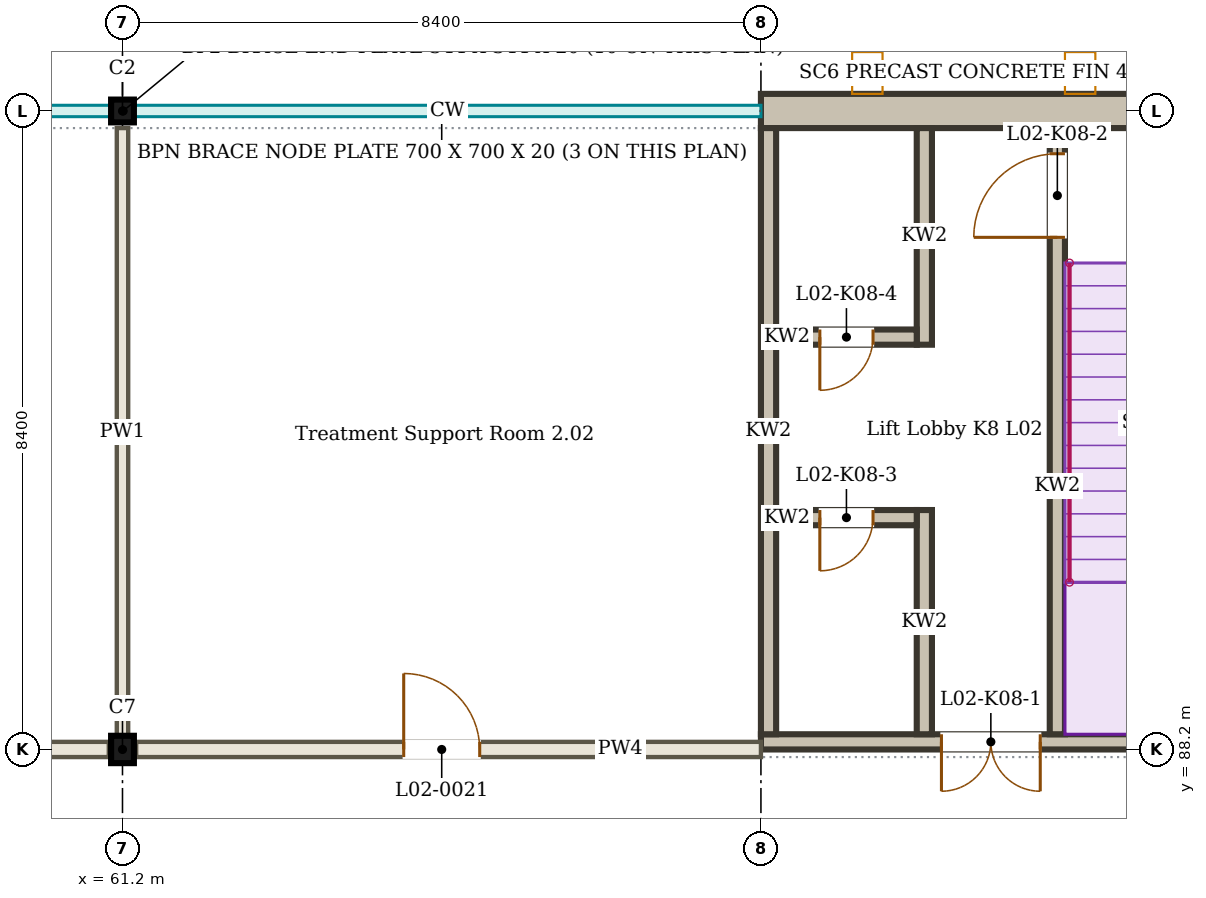
"""IFC4 building model, lengths in metres.
Left out: names, types, materials, properties, quantities, classifications, styles, units other than length and angle.
Written with IfcOpenShell. Run it as: python <this file> out.ifc"""

import sys

from ifc_helpers import new_model, si_unit, direction, frame, frame_2d, origin, origin_2d, place, context, subcontext, project, spatial, rectangle, i_section, extrude, element, fill, save


model = new_model("IFC4")
c1 = context("Model", 3, precision=1e-05, world=origin(), true_north=direction((0.0, 1.0)))
c2 = subcontext(c1, "Body", "Model", "MODEL_VIEW")
j1 = project(units=[si_unit("LENGTHUNIT", "METRE"), si_unit("PLANEANGLEUNIT", "RADIAN")], contexts=[c1])
p1 = place(None, origin())
s1 = spatial("IfcSite", under=j1, at=p1, CompositionType="ELEMENT")
p2 = place(p1, origin())
s2 = spatial("IfcBuilding", under=s1, at=p2, CompositionType="ELEMENT")
p3 = place(p2, frame((0.0, 0.0, 9.0)))
s3 = spatial("IfcBuildingStorey", under=s2, at=p3, CompositionType="ELEMENT", Elevation=9.0)
p4 = place(p3, frame((61.2, 88.2, 0.0), z_axis=(0.0, 0.0, 1.0), x_axis=(1.0, 0.0, 0.0)))
e1 = element("IfcColumn", 1, at=p4, inside=s3, PredefinedType="COLUMN", context=c2, shape_type="SweptSolid", body=[
    extrude(i_section(OverallWidth=0.3, OverallDepth=0.36, WebThickness=0.012, FlangeThickness=0.022, FilletRadius=0.027, at=origin_2d()), origin(), (0.0, 0.0, 1.0), 4.5),
])
p5 = place(p3, frame((61.2, 96.6, 0.0), z_axis=(0.0, 0.0, 1.0), x_axis=(1.0, 0.0, 0.0)))
e2 = element("IfcColumn", 2, at=p5, inside=s3, PredefinedType="COLUMN", context=c2, shape_type="SweptSolid", body=[
    extrude(i_section(OverallWidth=0.3, OverallDepth=0.3, WebThickness=0.011, FlangeThickness=0.019, FilletRadius=0.027, at=origin_2d()), origin(), (0.0, 0.0, 1.0), 4.5),
])
p6 = place(p3, frame((52.98, 88.2, 0.0), z_axis=(0.0, 0.0, 1.0), x_axis=(1.0, 0.0, 0.0)))
e3 = element("IfcWall", 3, at=p6, inside=s3, PredefinedType="PARTITIONING", context=c2, shape_type="SweptSolid", body=[
    extrude(rectangle(XDim=8.04, YDim=0.2, at=frame_2d((4.02, 0.0))), origin(), (0.0, 0.0, 1.0), 3.9),
])
p7 = place(p6, frame((3.52, 0.0, 0.0)))
e4 = element("IfcOpeningElement", 4, at=p7, cuts=e3, PredefinedType="OPENING", context=c2, shape_type="SweptSolid", body=[
    extrude(rectangle(XDim=1.0, YDim=2.1, at=frame_2d((0.5, 1.05))), frame((0.0, 0.11, 0.0), z_axis=(0.0, -1.0, 0.0), x_axis=(1.0, 0.0, 0.0)), (0.0, 0.0, 1.0), 0.22),
])
p8 = place(p3, frame((61.38, 88.2, 0.0), z_axis=(0.0, 0.0, 1.0), x_axis=(1.0, 0.0, 0.0)))
e5 = element("IfcWall", 5, at=p8, inside=s3, PredefinedType="PARTITIONING", context=c2, shape_type="SweptSolid", body=[
    extrude(rectangle(XDim=8.22, YDim=0.2, at=frame_2d((4.11, 0.0))), origin(), (0.0, 0.0, 1.0), 3.9),
])
p9 = place(p8, frame((3.52, 0.0, 0.0)))
e6 = element("IfcOpeningElement", 6, at=p9, cuts=e5, PredefinedType="OPENING", context=c2, shape_type="SweptSolid", body=[
    extrude(rectangle(XDim=1.0, YDim=2.1, at=frame_2d((0.5, 1.05))), frame((0.0, 0.11, 0.0), z_axis=(0.0, -1.0, 0.0), x_axis=(1.0, 0.0, 0.0)), (0.0, 0.0, 1.0), 0.22),
])
p10 = place(p3, frame((61.2, 88.38, 0.0), z_axis=(0.0, 0.0, 1.0), x_axis=(0.0, 1.0, 0.0)))
e7 = element("IfcWall", 7, at=p10, inside=s3, PredefinedType="PARTITIONING", context=c2, shape_type="SweptSolid", body=[
    extrude(rectangle(XDim=7.995, YDim=0.15, at=frame_2d((3.998, 0.0))), origin(), (0.0, 0.0, 1.0), 3.9),
])
p11 = place(p3, frame((78.0, 88.3, 0.0), z_axis=(0.0, 0.0, 1.0), x_axis=(-1.0, 0.0, 0.0)))
e8 = element("IfcWall", 8, at=p11, inside=s3, PredefinedType="SOLIDWALL", context=c2, shape_type="SweptSolid", body=[
    extrude(rectangle(XDim=8.4, YDim=0.2, at=frame_2d((4.2, 0.0))), origin(), (0.0, 0.0, 1.0), 4.5),
])
p12 = place(p11, frame((4.725, 0.0, 0.0)))
e9 = element("IfcOpeningElement", 9, at=p12, cuts=e8, PredefinedType="OPENING", context=c2, shape_type="SweptSolid", body=[
    extrude(rectangle(XDim=1.3, YDim=2.1, at=frame_2d((0.65, 1.05))), frame((0.0, 0.11, 0.0), z_axis=(0.0, -1.0, 0.0), x_axis=(1.0, 0.0, 0.0)), (0.0, 0.0, 1.0), 0.22),
])
p13 = place(p3, frame((78.0, 96.6, 0.0), z_axis=(0.0, 0.0, 1.0), x_axis=(-1.0, 0.0, 0.0)))
e10 = element("IfcWall", 10, at=p13, inside=s3, PredefinedType="SOLIDWALL", context=c2, shape_type="SweptSolid", body=[
    extrude(rectangle(XDim=8.4, YDim=0.45, at=frame_2d((4.2, 0.0))), origin(), (0.0, 0.0, 1.0), 4.5),
])
p14 = place(p3, frame((69.7, 88.4, 0.0), z_axis=(0.0, 0.0, 1.0), x_axis=(0.0, 1.0, 0.0)))
e11 = element("IfcWall", 11, at=p14, inside=s3, PredefinedType="SOLIDWALL", context=c2, shape_type="SweptSolid", body=[
    extrude(rectangle(XDim=7.975, YDim=0.2, at=frame_2d((3.988, 0.0))), origin(), (0.0, 0.0, 1.0), 4.5),
])
p15 = place(p3, frame((73.5, 88.4, 0.0), z_axis=(0.0, 0.0, 1.0), x_axis=(0.0, 1.0, 0.0)))
e12 = element("IfcWall", 12, at=p15, inside=s3, PredefinedType="SOLIDWALL", context=c2, shape_type="SweptSolid", body=[
    extrude(rectangle(XDim=7.975, YDim=0.2, at=frame_2d((3.988, 0.0))), origin(), (0.0, 0.0, 1.0), 4.5),
])
p16 = place(p15, frame((6.538, 0.0, 0.0)))
e13 = element("IfcOpeningElement", 13, at=p16, cuts=e12, PredefinedType="OPENING", context=c2, shape_type="SweptSolid", body=[
    extrude(rectangle(XDim=1.1, YDim=2.1, at=frame_2d((0.55, 1.05))), frame((0.0, 0.11, 0.0), z_axis=(0.0, -1.0, 0.0), x_axis=(1.0, 0.0, 0.0)), (0.0, 0.0, 1.0), 0.22),
])
p17 = place(p3, frame((71.75, 88.4, 0.0), z_axis=(0.0, 0.0, 1.0), x_axis=(0.0, 1.0, 0.0)))
e14 = element("IfcWall", 14, at=p17, inside=s3, PredefinedType="SOLIDWALL", context=c2, shape_type="SweptSolid", body=[
    extrude(rectangle(XDim=2.95, YDim=0.2, at=frame_2d((1.475, 0.0))), origin(), (0.0, 0.0, 1.0), 4.3),
])
p18 = place(p3, frame((71.75, 93.525, 0.0), z_axis=(0.0, 0.0, 1.0), x_axis=(0.0, 1.0, 0.0)))
e15 = element("IfcWall", 15, at=p18, inside=s3, PredefinedType="SOLIDWALL", context=c2, shape_type="SweptSolid", body=[
    extrude(rectangle(XDim=2.85, YDim=0.2, at=frame_2d((1.425, 0.0))), origin(), (0.0, 0.0, 1.0), 4.3),
])
p19 = place(p3, frame((71.65, 91.25, 0.0), z_axis=(0.0, 0.0, 1.0), x_axis=(-1.0, 0.0, 0.0)))
e16 = element("IfcWall", 16, at=p19, inside=s3, PredefinedType="SOLIDWALL", context=c2, shape_type="SweptSolid", body=[
    extrude(rectangle(XDim=1.85, YDim=0.2, at=frame_2d((0.925, 0.0))), origin(), (0.0, 0.0, 1.0), 4.3),
])
p20 = place(p19, frame((0.575, 0.0, 0.0)))
e17 = element("IfcOpeningElement", 17, at=p20, cuts=e16, PredefinedType="OPENING", context=c2, shape_type="SweptSolid", body=[
    extrude(rectangle(XDim=0.7, YDim=2.1, at=frame_2d((0.35, 1.05))), frame((0.0, 0.11, 0.0), z_axis=(0.0, -1.0, 0.0), x_axis=(1.0, 0.0, 0.0)), (0.0, 0.0, 1.0), 0.22),
])
p21 = place(p3, frame((71.65, 93.625, 0.0), z_axis=(0.0, 0.0, 1.0), x_axis=(-1.0, 0.0, 0.0)))
e18 = element("IfcWall", 18, at=p21, inside=s3, PredefinedType="SOLIDWALL", context=c2, shape_type="SweptSolid", body=[
    extrude(rectangle(XDim=1.85, YDim=0.2, at=frame_2d((0.925, 0.0))), origin(), (0.0, 0.0, 1.0), 4.3),
])
p22 = place(p21, frame((0.575, 0.0, 0.0)))
e19 = element("IfcOpeningElement", 19, at=p22, cuts=e18, PredefinedType="OPENING", context=c2, shape_type="SweptSolid", body=[
    extrude(rectangle(XDim=0.7, YDim=2.1, at=frame_2d((0.35, 1.05))), frame((0.0, 0.11, 0.0), z_axis=(0.0, -1.0, 0.0), x_axis=(1.0, 0.0, 0.0)), (0.0, 0.0, 1.0), 0.22),
])
p23 = place(p9, origin())
e20 = element("IfcDoor", 20, at=p23, inside=s3, OperationType="SINGLE_SWING_LEFT", PredefinedType="DOOR", context=c2, shape_type="SweptSolid", body=[
    extrude(rectangle(XDim=1.0, YDim=2.1, at=frame_2d((0.5, 1.05))), frame((0.0, 0.025, 0.0), z_axis=(0.0, -1.0, 0.0), x_axis=(1.0, 0.0, 0.0)), (0.0, 0.0, 1.0), 0.05),
])
fill(e6, e20)
p24 = place(p12, origin())
e21 = element("IfcDoor", 21, at=p24, inside=s3, OperationType="DOUBLE_DOOR_DOUBLE_SWING", PredefinedType="DOOR", context=c2, shape_type="SweptSolid", body=[
    extrude(rectangle(XDim=1.3, YDim=2.1, at=frame_2d((0.65, 1.05))), frame((0.0, 0.025, 0.0), z_axis=(0.0, -1.0, 0.0), x_axis=(1.0, 0.0, 0.0)), (0.0, 0.0, 1.0), 0.05),
])
fill(e9, e21)
p25 = place(p16, origin())
e22 = element("IfcDoor", 22, at=p25, inside=s3, OperationType="SINGLE_SWING_LEFT", PredefinedType="DOOR", context=c2, shape_type="SweptSolid", body=[
    extrude(rectangle(XDim=1.1, YDim=2.1, at=frame_2d((0.55, 1.05))), frame((0.0, 0.025, 0.0), z_axis=(0.0, -1.0, 0.0), x_axis=(1.0, 0.0, 0.0)), (0.0, 0.0, 1.0), 0.05),
])
fill(e13, e22)
p26 = place(p20, origin())
e23 = element("IfcDoor", 23, at=p26, inside=s3, OperationType="SINGLE_SWING_RIGHT", PredefinedType="DOOR", context=c2, shape_type="SweptSolid", body=[
    extrude(rectangle(XDim=0.7, YDim=2.1, at=frame_2d((0.35, 1.05))), frame((0.0, 0.025, 0.0), z_axis=(0.0, -1.0, 0.0), x_axis=(1.0, 0.0, 0.0)), (0.0, 0.0, 1.0), 0.05),
])
fill(e17, e23)
p27 = place(p22, origin())
e24 = element("IfcDoor", 24, at=p27, inside=s3, OperationType="SINGLE_SWING_RIGHT", PredefinedType="DOOR", context=c2, shape_type="SweptSolid", body=[
    extrude(rectangle(XDim=0.7, YDim=2.1, at=frame_2d((0.35, 1.05))), frame((0.0, 0.025, 0.0), z_axis=(0.0, -1.0, 0.0), x_axis=(1.0, 0.0, 0.0)), (0.0, 0.0, 1.0), 0.05),
])
fill(e19, e24)
save(model, sys.argv[1])
